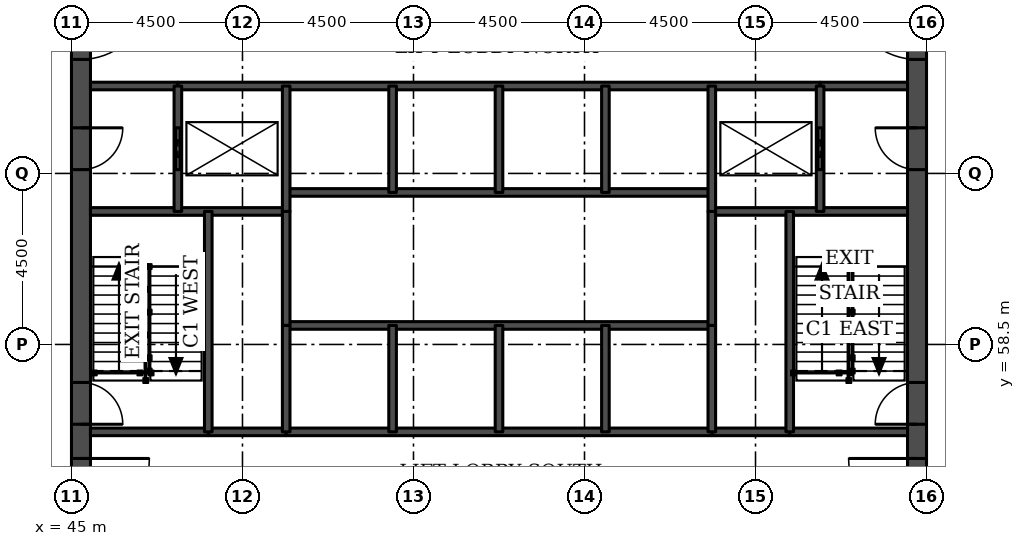
"""IFC4 building model, lengths in metres.
Left out: names, types, materials, properties, quantities, classifications, styles, units other than length and angle.
Written with IfcOpenShell. Run it as: python <this file> out.ifc"""

import sys

from ifc_helpers import new_model, si_unit, direction, frame, frame_2d, origin, place, context, subcontext, project, spatial, rectangle, extrude, element, fill, save


model = new_model("IFC4")
c1 = context("Model", 3, precision=1e-05, world=origin(), true_north=direction((0.0, 1.0)))
c2 = subcontext(c1, "Body", "Model", "MODEL_VIEW")
j1 = project(units=[si_unit("LENGTHUNIT", "METRE"), si_unit("PLANEANGLEUNIT", "RADIAN")], contexts=[c1])
p1 = place(None, origin())
s1 = spatial("IfcSite", under=j1, at=p1, CompositionType="ELEMENT")
p2 = place(p1, origin())
s2 = spatial("IfcBuilding", under=s1, at=p2, CompositionType="ELEMENT")
p3 = place(p2, frame((0.0, 0.0, 18.5)))
s3 = spatial("IfcBuildingStorey", under=s2, at=p3, CompositionType="ELEMENT", Elevation=18.5)
p4 = place(p3, frame((45.25, 49.5, 0.0), z_axis=(0.0, 0.0, 1.0), x_axis=(0.0, 1.0, 0.0)))
e1 = element("IfcWall", 1, at=p4, inside=s3, PredefinedType="SHEAR", context=c2, shape_type="SweptSolid", body=[
    extrude(rectangle(XDim=22.5, YDim=0.5, at=frame_2d((11.25, 0.0))), origin(), (0.0, 0.0, 1.0), 4.6),
])
p5 = place(p4, frame((4.2, 0.0, 0.0)))
e2 = element("IfcOpeningElement", 2, at=p5, cuts=e1, PredefinedType="OPENING", context=c2, shape_type="SweptSolid", body=[
    extrude(rectangle(XDim=1.8, YDim=2.1, at=frame_2d((0.9, 1.05))), frame((0.0, 0.26, 0.0), z_axis=(0.0, -1.0, 0.0), x_axis=(1.0, 0.0, 0.0)), (0.0, 0.0, 1.0), 0.52),
])
p6 = place(p4, frame((6.9, 0.0, 0.0)))
e3 = element("IfcOpeningElement", 3, at=p6, cuts=e1, PredefinedType="OPENING", context=c2, shape_type="SweptSolid", body=[
    extrude(rectangle(XDim=1.1, YDim=2.1, at=frame_2d((0.55, 1.05))), frame((0.0, 0.26, 0.0), z_axis=(0.0, -1.0, 0.0), x_axis=(1.0, 0.0, 0.0)), (0.0, 0.0, 1.0), 0.52),
])
p7 = place(p4, frame((13.6, 0.0, 0.0)))
e4 = element("IfcOpeningElement", 4, at=p7, cuts=e1, PredefinedType="OPENING", context=c2, shape_type="SweptSolid", body=[
    extrude(rectangle(XDim=1.1, YDim=2.1, at=frame_2d((0.55, 1.05))), frame((0.0, 0.26, 0.0), z_axis=(0.0, -1.0, 0.0), x_axis=(1.0, 0.0, 0.0)), (0.0, 0.0, 1.0), 0.52),
])
p8 = place(p4, frame((16.5, 0.0, 0.0)))
e5 = element("IfcOpeningElement", 5, at=p8, cuts=e1, PredefinedType="OPENING", context=c2, shape_type="SweptSolid", body=[
    extrude(rectangle(XDim=1.8, YDim=2.1, at=frame_2d((0.9, 1.05))), frame((0.0, 0.26, 0.0), z_axis=(0.0, -1.0, 0.0), x_axis=(1.0, 0.0, 0.0)), (0.0, 0.0, 1.0), 0.52),
])
p9 = place(p3, frame((67.25, 49.5, 0.0), z_axis=(0.0, 0.0, 1.0), x_axis=(0.0, 1.0, 0.0)))
e6 = element("IfcWall", 6, at=p9, inside=s3, PredefinedType="SHEAR", context=c2, shape_type="SweptSolid", body=[
    extrude(rectangle(XDim=22.5, YDim=0.5, at=frame_2d((11.25, 0.0))), origin(), (0.0, 0.0, 1.0), 4.6),
])
p10 = place(p9, frame((4.2, 0.0, 0.0)))
e7 = element("IfcOpeningElement", 7, at=p10, cuts=e6, PredefinedType="OPENING", context=c2, shape_type="SweptSolid", body=[
    extrude(rectangle(XDim=1.8, YDim=2.1, at=frame_2d((0.9, 1.05))), frame((0.0, 0.26, 0.0), z_axis=(0.0, -1.0, 0.0), x_axis=(1.0, 0.0, 0.0)), (0.0, 0.0, 1.0), 0.52),
])
p11 = place(p9, frame((6.9, 0.0, 0.0)))
e8 = element("IfcOpeningElement", 8, at=p11, cuts=e6, PredefinedType="OPENING", context=c2, shape_type="SweptSolid", body=[
    extrude(rectangle(XDim=1.1, YDim=2.1, at=frame_2d((0.55, 1.05))), frame((0.0, 0.26, 0.0), z_axis=(0.0, -1.0, 0.0), x_axis=(1.0, 0.0, 0.0)), (0.0, 0.0, 1.0), 0.52),
])
p12 = place(p9, frame((13.6, 0.0, 0.0)))
e9 = element("IfcOpeningElement", 9, at=p12, cuts=e6, PredefinedType="OPENING", context=c2, shape_type="SweptSolid", body=[
    extrude(rectangle(XDim=1.1, YDim=2.1, at=frame_2d((0.55, 1.05))), frame((0.0, 0.26, 0.0), z_axis=(0.0, -1.0, 0.0), x_axis=(1.0, 0.0, 0.0)), (0.0, 0.0, 1.0), 0.52),
])
p13 = place(p9, frame((16.5, 0.0, 0.0)))
e10 = element("IfcOpeningElement", 10, at=p13, cuts=e6, PredefinedType="OPENING", context=c2, shape_type="SweptSolid", body=[
    extrude(rectangle(XDim=1.8, YDim=2.1, at=frame_2d((0.9, 1.05))), frame((0.0, 0.26, 0.0), z_axis=(0.0, -1.0, 0.0), x_axis=(1.0, 0.0, 0.0)), (0.0, 0.0, 1.0), 0.52),
])
for number, where, z_axis, x_axis in (
    (11, (48.6, 56.2, 0.0), (0.0, 0.0, 1.0), (1.0, 0.0, 0.0)),
    (12, (61.85, 56.2, 0.0), (0.0, 0.0, 1.0), (1.0, 0.0, 0.0)),
):
    element("IfcWall", number, at=place(p3, frame(where, z_axis=z_axis, x_axis=x_axis)), inside=s3, PredefinedType="SOLIDWALL", context=c2, shape_type="SweptSolid", body=[
        extrude(rectangle(XDim=2.05, YDim=0.2, at=frame_2d((1.025, 0.0))), origin(), (0.0, 0.0, 1.0), 4.38),
    ])
p14 = place(p3, frame((45.5, 56.2, 0.0), z_axis=(0.0, 0.0, 1.0), x_axis=(1.0, 0.0, 0.0)))
e13 = element("IfcWall", 13, at=p14, inside=s3, PredefinedType="SOLIDWALL", context=c2, shape_type="SweptSolid", body=[
    extrude(rectangle(XDim=3.1, YDim=0.2, at=frame_2d((1.55, 0.0))), origin(), (0.0, 0.0, 1.0), 4.38),
])
p15 = place(p3, frame((50.65, 56.2, 0.0), z_axis=(0.0, 0.0, 1.0), x_axis=(1.0, 0.0, 0.0)))
e14 = element("IfcWall", 14, at=p15, inside=s3, PredefinedType="SOLIDWALL", context=c2, shape_type="SweptSolid", body=[
    extrude(rectangle(XDim=11.2, YDim=0.2, at=frame_2d((5.6, 0.0))), origin(), (0.0, 0.0, 1.0), 4.38),
])
p16 = place(p3, frame((63.9, 56.2, 0.0), z_axis=(0.0, 0.0, 1.0), x_axis=(1.0, 0.0, 0.0)))
e15 = element("IfcWall", 15, at=p16, inside=s3, PredefinedType="SOLIDWALL", context=c2, shape_type="SweptSolid", body=[
    extrude(rectangle(XDim=3.1, YDim=0.2, at=frame_2d((1.55, 0.0))), origin(), (0.0, 0.0, 1.0), 4.38),
])
p17 = place(p3, frame((50.65, 59.0, 0.0), z_axis=(0.0, 0.0, 1.0), x_axis=(1.0, 0.0, 0.0)))
e16 = element("IfcWall", 16, at=p17, inside=s3, PredefinedType="SOLIDWALL", context=c2, shape_type="SweptSolid", body=[
    extrude(rectangle(XDim=11.2, YDim=0.2, at=frame_2d((5.6, 0.0))), origin(), (0.0, 0.0, 1.0), 4.6),
])
for number, where, z_axis, x_axis in (
    (17, (45.5, 62.0, 0.0), (0.0, 0.0, 1.0), (1.0, 0.0, 0.0)),
    (18, (61.85, 62.0, 0.0), (0.0, 0.0, 1.0), (1.0, 0.0, 0.0)),
):
    element("IfcWall", number, at=place(p3, frame(where, z_axis=z_axis, x_axis=x_axis)), inside=s3, PredefinedType="SOLIDWALL", context=c2, shape_type="SweptSolid", body=[
        extrude(rectangle(XDim=5.15, YDim=0.2, at=frame_2d((2.575, 0.0))), origin(), (0.0, 0.0, 1.0), 4.38),
    ])
p18 = place(p3, frame((50.65, 62.5, 0.0), z_axis=(0.0, 0.0, 1.0), x_axis=(1.0, 0.0, 0.0)))
e19 = element("IfcWall", 19, at=p18, inside=s3, PredefinedType="SOLIDWALL", context=c2, shape_type="SweptSolid", body=[
    extrude(rectangle(XDim=11.2, YDim=0.2, at=frame_2d((5.6, 0.0))), origin(), (0.0, 0.0, 1.0), 4.6),
])
for number, where, z_axis, x_axis in (
    (20, (45.5, 65.3, 0.0), (0.0, 0.0, 1.0), (1.0, 0.0, 0.0)),
    (21, (64.7, 65.3, 0.0), (0.0, 0.0, 1.0), (1.0, 0.0, 0.0)),
):
    element("IfcWall", number, at=place(p3, frame(where, z_axis=z_axis, x_axis=x_axis)), inside=s3, PredefinedType="SOLIDWALL", context=c2, shape_type="SweptSolid", body=[
        extrude(rectangle(XDim=2.3, YDim=0.2, at=frame_2d((1.15, 0.0))), origin(), (0.0, 0.0, 1.0), 4.38),
    ])
p19 = place(p3, frame((47.8, 65.3, 0.0), z_axis=(0.0, 0.0, 1.0), x_axis=(1.0, 0.0, 0.0)))
e22 = element("IfcWall", 22, at=p19, inside=s3, PredefinedType="SOLIDWALL", context=c2, shape_type="SweptSolid", body=[
    extrude(rectangle(XDim=16.9, YDim=0.2, at=frame_2d((8.45, 0.0))), origin(), (0.0, 0.0, 1.0), 4.38),
])
p20 = place(p3, frame((47.8, 62.0, 0.0), z_axis=(0.0, 0.0, 1.0), x_axis=(0.0, 1.0, 0.0)))
e23 = element("IfcWall", 23, at=p20, inside=s3, PredefinedType="SOLIDWALL", context=c2, shape_type="SweptSolid", body=[
    extrude(rectangle(XDim=3.3, YDim=0.2, at=frame_2d((1.65, 0.0))), origin(), (0.0, 0.0, 1.0), 4.38),
])
p21 = place(p20, frame((1.1, 0.0, 0.0)))
e24 = element("IfcOpeningElement", 24, at=p21, cuts=e23, PredefinedType="OPENING", context=c2, shape_type="SweptSolid", body=[
    extrude(rectangle(XDim=1.1, YDim=2.1, at=frame_2d((0.55, 1.05))), frame((0.0, 0.11, 0.0), z_axis=(0.0, -1.0, 0.0), x_axis=(1.0, 0.0, 0.0)), (0.0, 0.0, 1.0), 0.22),
])
p22 = place(p3, frame((48.6, 56.2, 0.0), z_axis=(0.0, 0.0, 1.0), x_axis=(0.0, 1.0, 0.0)))
e25 = element("IfcWall", 25, at=p22, inside=s3, PredefinedType="SOLIDWALL", context=c2, shape_type="SweptSolid", body=[
    extrude(rectangle(XDim=5.8, YDim=0.2, at=frame_2d((2.9, 0.0))), origin(), (0.0, 0.0, 1.0), 4.38),
])
p23 = place(p3, frame((50.65, 59.0, 0.0), z_axis=(0.0, 0.0, 1.0), x_axis=(0.0, 1.0, 0.0)))
e26 = element("IfcWall", 26, at=p23, inside=s3, PredefinedType="SOLIDWALL", context=c2, shape_type="SweptSolid", body=[
    extrude(rectangle(XDim=3.0, YDim=0.2, at=frame_2d((1.5, 0.0))), origin(), (0.0, 0.0, 1.0), 4.6),
])
p24 = place(p3, frame((50.65, 56.2, 0.0), z_axis=(0.0, 0.0, 1.0), x_axis=(0.0, 1.0, 0.0)))
e27 = element("IfcWall", 27, at=p24, inside=s3, PredefinedType="SOLIDWALL", context=c2, shape_type="SweptSolid", body=[
    extrude(rectangle(XDim=2.8, YDim=0.2, at=frame_2d((1.4, 0.0))), origin(), (0.0, 0.0, 1.0), 4.38),
])
p25 = place(p3, frame((50.65, 62.0, 0.0), z_axis=(0.0, 0.0, 1.0), x_axis=(0.0, 1.0, 0.0)))
e28 = element("IfcWall", 28, at=p25, inside=s3, PredefinedType="SOLIDWALL", context=c2, shape_type="SweptSolid", body=[
    extrude(rectangle(XDim=3.3, YDim=0.2, at=frame_2d((1.65, 0.0))), origin(), (0.0, 0.0, 1.0), 4.38),
])
for number, where, z_axis, x_axis in (
    (29, (53.45, 56.2, 0.0), (0.0, 0.0, 1.0), (0.0, 1.0, 0.0)),
    (30, (53.45, 62.5, 0.0), (0.0, 0.0, 1.0), (0.0, 1.0, 0.0)),
    (31, (56.25, 56.2, 0.0), (0.0, 0.0, 1.0), (0.0, 1.0, 0.0)),
    (32, (56.25, 62.5, 0.0), (0.0, 0.0, 1.0), (0.0, 1.0, 0.0)),
    (33, (59.05, 56.2, 0.0), (0.0, 0.0, 1.0), (0.0, 1.0, 0.0)),
    (34, (59.05, 62.5, 0.0), (0.0, 0.0, 1.0), (0.0, 1.0, 0.0)),
):
    element("IfcWall", number, at=place(p3, frame(where, z_axis=z_axis, x_axis=x_axis)), inside=s3, PredefinedType="SOLIDWALL", context=c2, shape_type="SweptSolid", body=[
        extrude(rectangle(XDim=2.8, YDim=0.2, at=frame_2d((1.4, 0.0))), origin(), (0.0, 0.0, 1.0), 4.38),
    ])
p26 = place(p3, frame((61.85, 59.0, 0.0), z_axis=(0.0, 0.0, 1.0), x_axis=(0.0, 1.0, 0.0)))
e35 = element("IfcWall", 35, at=p26, inside=s3, PredefinedType="SOLIDWALL", context=c2, shape_type="SweptSolid", body=[
    extrude(rectangle(XDim=3.0, YDim=0.2, at=frame_2d((1.5, 0.0))), origin(), (0.0, 0.0, 1.0), 4.6),
])
p27 = place(p3, frame((61.85, 56.2, 0.0), z_axis=(0.0, 0.0, 1.0), x_axis=(0.0, 1.0, 0.0)))
e36 = element("IfcWall", 36, at=p27, inside=s3, PredefinedType="SOLIDWALL", context=c2, shape_type="SweptSolid", body=[
    extrude(rectangle(XDim=2.8, YDim=0.2, at=frame_2d((1.4, 0.0))), origin(), (0.0, 0.0, 1.0), 4.38),
])
p28 = place(p3, frame((61.85, 62.0, 0.0), z_axis=(0.0, 0.0, 1.0), x_axis=(0.0, 1.0, 0.0)))
e37 = element("IfcWall", 37, at=p28, inside=s3, PredefinedType="SOLIDWALL", context=c2, shape_type="SweptSolid", body=[
    extrude(rectangle(XDim=3.3, YDim=0.2, at=frame_2d((1.65, 0.0))), origin(), (0.0, 0.0, 1.0), 4.38),
])
p29 = place(p3, frame((63.9, 56.2, 0.0), z_axis=(0.0, 0.0, 1.0), x_axis=(0.0, 1.0, 0.0)))
e38 = element("IfcWall", 38, at=p29, inside=s3, PredefinedType="SOLIDWALL", context=c2, shape_type="SweptSolid", body=[
    extrude(rectangle(XDim=5.8, YDim=0.2, at=frame_2d((2.9, 0.0))), origin(), (0.0, 0.0, 1.0), 4.38),
])
p30 = place(p3, frame((64.7, 62.0, 0.0), z_axis=(0.0, 0.0, 1.0), x_axis=(0.0, 1.0, 0.0)))
e39 = element("IfcWall", 39, at=p30, inside=s3, PredefinedType="SOLIDWALL", context=c2, shape_type="SweptSolid", body=[
    extrude(rectangle(XDim=3.3, YDim=0.2, at=frame_2d((1.65, 0.0))), origin(), (0.0, 0.0, 1.0), 4.38),
])
p31 = place(p30, frame((1.1, 0.0, 0.0)))
e40 = element("IfcOpeningElement", 40, at=p31, cuts=e39, PredefinedType="OPENING", context=c2, shape_type="SweptSolid", body=[
    extrude(rectangle(XDim=1.1, YDim=2.1, at=frame_2d((0.55, 1.05))), frame((0.0, 0.11, 0.0), z_axis=(0.0, -1.0, 0.0), x_axis=(1.0, 0.0, 0.0)), (0.0, 0.0, 1.0), 0.22),
])
p32 = place(p21, origin())
e41 = element("IfcDoor", 41, at=p32, inside=s3, OperationType="DOUBLE_DOOR_SLIDING", PredefinedType="DOOR", context=c2, shape_type="SweptSolid", body=[
    extrude(rectangle(XDim=1.1, YDim=2.1, at=frame_2d((0.55, 1.05))), frame((0.0, 0.025, 0.0), z_axis=(0.0, -1.0, 0.0), x_axis=(1.0, 0.0, 0.0)), (0.0, 0.0, 1.0), 0.05),
])
fill(e24, e41)
p33 = place(p31, origin())
e42 = element("IfcDoor", 42, at=p33, inside=s3, OperationType="DOUBLE_DOOR_SLIDING", PredefinedType="DOOR", context=c2, shape_type="SweptSolid", body=[
    extrude(rectangle(XDim=1.1, YDim=2.1, at=frame_2d((0.55, 1.05))), frame((0.0, 0.025, 0.0), z_axis=(0.0, -1.0, 0.0), x_axis=(1.0, 0.0, 0.0)), (0.0, 0.0, 1.0), 0.05),
])
fill(e40, e42)
p34 = place(p5, frame((1.8, 0.0, 0.0), z_axis=(0.0, 0.0, 1.0), x_axis=(-1.0, 0.0, 0.0)))
e43 = element("IfcDoor", 43, at=p34, inside=s3, OperationType="SINGLE_SWING_LEFT", PredefinedType="DOOR", context=c2, shape_type="SweptSolid", body=[
    extrude(rectangle(XDim=1.8, YDim=2.1, at=frame_2d((0.9, 1.05))), frame((0.0, 0.025, 0.0), z_axis=(0.0, -1.0, 0.0), x_axis=(1.0, 0.0, 0.0)), (0.0, 0.0, 1.0), 0.05),
])
fill(e2, e43)
p35 = place(p6, frame((1.1, 0.0, 0.0), z_axis=(0.0, 0.0, 1.0), x_axis=(-1.0, 0.0, 0.0)))
e44 = element("IfcDoor", 44, at=p35, inside=s3, OperationType="SINGLE_SWING_RIGHT", PredefinedType="DOOR", context=c2, shape_type="SweptSolid", body=[
    extrude(rectangle(XDim=1.1, YDim=2.1, at=frame_2d((0.55, 1.05))), frame((0.0, 0.025, 0.0), z_axis=(0.0, -1.0, 0.0), x_axis=(1.0, 0.0, 0.0)), (0.0, 0.0, 1.0), 0.05),
])
fill(e3, e44)
p36 = place(p7, frame((1.1, 0.0, 0.0), z_axis=(0.0, 0.0, 1.0), x_axis=(-1.0, 0.0, 0.0)))
e45 = element("IfcDoor", 45, at=p36, inside=s3, OperationType="SINGLE_SWING_LEFT", PredefinedType="DOOR", context=c2, shape_type="SweptSolid", body=[
    extrude(rectangle(XDim=1.1, YDim=2.1, at=frame_2d((0.55, 1.05))), frame((0.0, 0.025, 0.0), z_axis=(0.0, -1.0, 0.0), x_axis=(1.0, 0.0, 0.0)), (0.0, 0.0, 1.0), 0.05),
])
fill(e4, e45)
p37 = place(p8, frame((1.8, 0.0, 0.0), z_axis=(0.0, 0.0, 1.0), x_axis=(-1.0, 0.0, 0.0)))
e46 = element("IfcDoor", 46, at=p37, inside=s3, OperationType="SINGLE_SWING_LEFT", PredefinedType="DOOR", context=c2, shape_type="SweptSolid", body=[
    extrude(rectangle(XDim=1.8, YDim=2.1, at=frame_2d((0.9, 1.05))), frame((0.0, 0.025, 0.0), z_axis=(0.0, -1.0, 0.0), x_axis=(1.0, 0.0, 0.0)), (0.0, 0.0, 1.0), 0.05),
])
fill(e5, e46)
p38 = place(p10, origin())
e47 = element("IfcDoor", 47, at=p38, inside=s3, OperationType="SINGLE_SWING_RIGHT", PredefinedType="DOOR", context=c2, shape_type="SweptSolid", body=[
    extrude(rectangle(XDim=1.8, YDim=2.1, at=frame_2d((0.9, 1.05))), frame((0.0, 0.025, 0.0), z_axis=(0.0, -1.0, 0.0), x_axis=(1.0, 0.0, 0.0)), (0.0, 0.0, 1.0), 0.05),
])
fill(e7, e47)
p39 = place(p11, origin())
e48 = element("IfcDoor", 48, at=p39, inside=s3, OperationType="SINGLE_SWING_LEFT", PredefinedType="DOOR", context=c2, shape_type="SweptSolid", body=[
    extrude(rectangle(XDim=1.1, YDim=2.1, at=frame_2d((0.55, 1.05))), frame((0.0, 0.025, 0.0), z_axis=(0.0, -1.0, 0.0), x_axis=(1.0, 0.0, 0.0)), (0.0, 0.0, 1.0), 0.05),
])
fill(e8, e48)
p40 = place(p12, origin())
e49 = element("IfcDoor", 49, at=p40, inside=s3, OperationType="SINGLE_SWING_RIGHT", PredefinedType="DOOR", context=c2, shape_type="SweptSolid", body=[
    extrude(rectangle(XDim=1.1, YDim=2.1, at=frame_2d((0.55, 1.05))), frame((0.0, 0.025, 0.0), z_axis=(0.0, -1.0, 0.0), x_axis=(1.0, 0.0, 0.0)), (0.0, 0.0, 1.0), 0.05),
])
fill(e9, e49)
p41 = place(p13, origin())
e50 = element("IfcDoor", 50, at=p41, inside=s3, OperationType="SINGLE_SWING_RIGHT", PredefinedType="DOOR", context=c2, shape_type="SweptSolid", body=[
    extrude(rectangle(XDim=1.8, YDim=2.1, at=frame_2d((0.9, 1.05))), frame((0.0, 0.025, 0.0), z_axis=(0.0, -1.0, 0.0), x_axis=(1.0, 0.0, 0.0)), (0.0, 0.0, 1.0), 0.05),
])
fill(e10, e50)
save(model, sys.argv[1])
